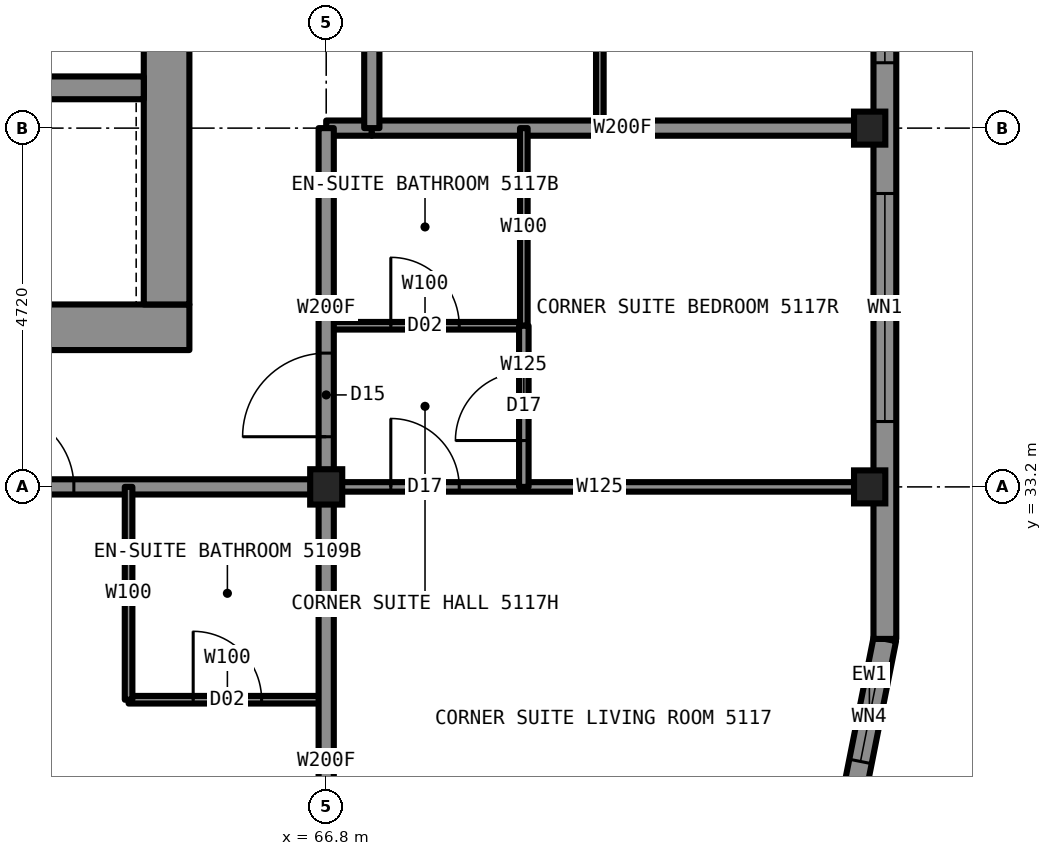
"""IFC4 building model, lengths in metres.
Left out: names, types, materials, properties, quantities, classifications, styles, units other than length and angle.
Written with IfcOpenShell. Run it as: python <this file> out.ifc"""

import sys

from ifc_helpers import new_model, si_unit, direction, frame, frame_2d, origin, origin_2d, place, context, subcontext, project, spatial, rectangle, i_section, extrude, element, fill, save


model = new_model("IFC4")
c1 = context("Model", 3, precision=1e-05, world=origin(), true_north=direction((0.0, 1.0)))
c2 = subcontext(c1, "Body", "Model", "MODEL_VIEW")
j1 = project(units=[si_unit("LENGTHUNIT", "METRE"), si_unit("PLANEANGLEUNIT", "RADIAN")], contexts=[c1])
p1 = place(None, origin())
s1 = spatial("IfcSite", under=j1, at=p1, CompositionType="ELEMENT")
p2 = place(p1, origin())
s2 = spatial("IfcBuilding", under=s1, at=p2, CompositionType="ELEMENT")
p3 = place(p2, frame((0.0, 0.0, 182.8)))
s3 = spatial("IfcBuildingStorey", under=s2, at=p3, CompositionType="ELEMENT", Elevation=182.8)
for number, where, z_axis, x_axis in (
    (1, (73.95, 33.2, 0.0), (0.0, 0.0, 1.0), (1.0, 0.0, 0.0)),
    (2, (73.95, 37.92, 0.0), (0.0, 0.0, 1.0), (1.0, 0.0, 0.0)),
):
    element("IfcColumn", number, at=place(p3, frame(where, z_axis=z_axis, x_axis=x_axis)), inside=s3, PredefinedType="COLUMN", context=c2, shape_type="SweptSolid", body=[
        extrude(i_section(OverallWidth=0.411, OverallDepth=0.434, WebThickness=0.036, FlangeThickness=0.057, at=origin_2d()), origin(), (0.0, 0.0, 1.0), 3.5),
    ])
p4 = place(p3, frame((66.8, 33.2, 0.0), z_axis=(0.0, 0.0, 1.0), x_axis=(1.0, 0.0, 0.0)))
e3 = element("IfcColumn", 3, at=p4, inside=s3, PredefinedType="COLUMN", context=c2, shape_type="SweptSolid", body=[
    extrude(i_section(OverallWidth=0.422, OverallDepth=0.465, WebThickness=0.045, FlangeThickness=0.073, at=origin_2d()), origin(), (0.0, 0.0, 1.0), 3.5),
])
p5 = place(p3, frame((45.0, 35.3, 0.0), z_axis=(0.0, 0.0, 1.0), x_axis=(1.0, 0.0, 0.0)))
e4 = element("IfcWall", 4, at=p5, inside=s3, PredefinedType="SHEAR", context=c2, shape_type="SweptSolid", body=[
    extrude(rectangle(XDim=20.0, YDim=0.6, at=frame_2d((10.0, 0.0))), origin(), (0.0, 0.0, 1.0), 3.5),
])
p6 = place(p3, frame((64.7, 35.6, 0.0), z_axis=(0.0, 0.0, 1.0), x_axis=(0.0, 1.0, 0.0)))
e5 = element("IfcWall", 5, at=p6, inside=s3, PredefinedType="SHEAR", context=c2, shape_type="SweptSolid", body=[
    extrude(rectangle(XDim=18.8, YDim=0.6, at=frame_2d((9.4, 0.0))), origin(), (0.0, 0.0, 1.0), 3.5),
])
p7 = place(p6, frame((13.4, 0.0, 0.0)))
e6 = element("IfcOpeningElement", 6, at=p7, cuts=e5, PredefinedType="OPENING", context=c2, shape_type="SweptSolid", body=[
    extrude(rectangle(XDim=1.8, YDim=2.2, at=frame_2d((0.9, 1.1))), frame((0.0, 0.31, 0.0), z_axis=(0.0, -1.0, 0.0), x_axis=(1.0, 0.0, 0.0)), (0.0, 0.0, 1.0), 0.62),
])
p8 = place(p6, frame((3.6, 0.0, 0.0)))
e7 = element("IfcOpeningElement", 7, at=p8, cuts=e5, PredefinedType="OPENING", context=c2, shape_type="SweptSolid", body=[
    extrude(rectangle(XDim=1.8, YDim=2.2, at=frame_2d((0.9, 1.1))), frame((0.0, 0.31, 0.0), z_axis=(0.0, -1.0, 0.0), x_axis=(1.0, 0.0, 0.0)), (0.0, 0.0, 1.0), 0.62),
])
p9 = place(p3, frame((45.6, 38.45, 0.0), z_axis=(0.0, 0.0, 1.0), x_axis=(1.0, 0.0, 0.0)))
e8 = element("IfcWall", 8, at=p9, inside=s3, PredefinedType="SHEAR", context=c2, shape_type="SweptSolid", body=[
    extrude(rectangle(XDim=18.8, YDim=0.3, at=frame_2d((9.4, 0.0))), origin(), (0.0, 0.0, 1.0), 3.5),
])
p10 = place(p9, frame((0.7, 0.0, 0.0)))
e9 = element("IfcOpeningElement", 9, at=p10, cuts=e8, PredefinedType="OPENING", context=c2, shape_type="SweptSolid", body=[
    extrude(rectangle(XDim=1.1, YDim=2.2, at=frame_2d((0.55, 1.1))), frame((0.0, 0.16, 0.0), z_axis=(0.0, -1.0, 0.0), x_axis=(1.0, 0.0, 0.0)), (0.0, 0.0, 1.0), 0.32),
])
p11 = place(p9, frame((3.4, 0.0, 0.0)))
e10 = element("IfcOpeningElement", 10, at=p11, cuts=e8, PredefinedType="OPENING", context=c2, shape_type="SweptSolid", body=[
    extrude(rectangle(XDim=1.1, YDim=2.2, at=frame_2d((0.55, 1.1))), frame((0.0, 0.16, 0.0), z_axis=(0.0, -1.0, 0.0), x_axis=(1.0, 0.0, 0.0)), (0.0, 0.0, 1.0), 0.32),
])
p12 = place(p9, frame((6.1, 0.0, 0.0)))
e11 = element("IfcOpeningElement", 11, at=p12, cuts=e8, PredefinedType="OPENING", context=c2, shape_type="SweptSolid", body=[
    extrude(rectangle(XDim=1.1, YDim=2.2, at=frame_2d((0.55, 1.1))), frame((0.0, 0.16, 0.0), z_axis=(0.0, -1.0, 0.0), x_axis=(1.0, 0.0, 0.0)), (0.0, 0.0, 1.0), 0.32),
])
p13 = place(p9, frame((8.8, 0.0, 0.0)))
e12 = element("IfcOpeningElement", 12, at=p13, cuts=e8, PredefinedType="OPENING", context=c2, shape_type="SweptSolid", body=[
    extrude(rectangle(XDim=1.1, YDim=2.2, at=frame_2d((0.55, 1.1))), frame((0.0, 0.16, 0.0), z_axis=(0.0, -1.0, 0.0), x_axis=(1.0, 0.0, 0.0)), (0.0, 0.0, 1.0), 0.32),
])
p14 = place(p3, frame((43.2, 33.2, 0.0), z_axis=(0.0, 0.0, 1.0), x_axis=(1.0, 0.0, 0.0)))
e13 = element("IfcWall", 13, at=p14, inside=s3, PredefinedType="PARTITIONING", context=c2, shape_type="SweptSolid", body=[
    extrude(rectangle(XDim=23.6, YDim=0.2, at=frame_2d((11.8, 0.0))), origin(), (0.0, 0.0, 1.0), 3.33),
])
p15 = place(p14, frame((3.0, 0.0, 0.0)))
e14 = element("IfcOpeningElement", 14, at=p15, cuts=e13, PredefinedType="OPENING", context=c2, shape_type="SweptSolid", body=[
    extrude(rectangle(XDim=1.0, YDim=2.2, at=frame_2d((0.5, 1.1))), frame((0.0, 0.11, 0.0), z_axis=(0.0, -1.0, 0.0), x_axis=(1.0, 0.0, 0.0)), (0.0, 0.0, 1.0), 0.22),
])
p16 = place(p14, frame((11.99, 0.0, 0.0)))
e15 = element("IfcOpeningElement", 15, at=p16, cuts=e13, PredefinedType="OPENING", context=c2, shape_type="SweptSolid", body=[
    extrude(rectangle(XDim=1.0, YDim=2.2, at=frame_2d((0.5, 1.1))), frame((0.0, 0.11, 0.0), z_axis=(0.0, -1.0, 0.0), x_axis=(1.0, 0.0, 0.0)), (0.0, 0.0, 1.0), 0.22),
])
p17 = place(p14, frame((16.71, 0.0, 0.0)))
e16 = element("IfcOpeningElement", 16, at=p17, cuts=e13, PredefinedType="OPENING", context=c2, shape_type="SweptSolid", body=[
    extrude(rectangle(XDim=1.0, YDim=2.2, at=frame_2d((0.5, 1.1))), frame((0.0, 0.11, 0.0), z_axis=(0.0, -1.0, 0.0), x_axis=(1.0, 0.0, 0.0)), (0.0, 0.0, 1.0), 0.22),
])
p18 = place(p14, frame((19.28, 0.0, 0.0)))
e17 = element("IfcOpeningElement", 17, at=p18, cuts=e13, PredefinedType="OPENING", context=c2, shape_type="SweptSolid", body=[
    extrude(rectangle(XDim=1.0, YDim=2.2, at=frame_2d((0.5, 1.1))), frame((0.0, 0.11, 0.0), z_axis=(0.0, -1.0, 0.0), x_axis=(1.0, 0.0, 0.0)), (0.0, 0.0, 1.0), 0.22),
])
p19 = place(p3, frame((66.8, 33.2, 0.0), z_axis=(0.0, 0.0, 1.0), x_axis=(1.0, 0.0, 0.0)))
e18 = element("IfcWall", 18, at=p19, inside=s3, PredefinedType="PARTITIONING", context=c2, shape_type="SweptSolid", body=[
    extrude(rectangle(XDim=7.2, YDim=0.125, at=frame_2d((3.6, 0.0))), origin(), (0.0, 0.0, 1.0), 2.573),
])
p20 = place(p19, frame((0.85, 0.0, 0.0)))
e19 = element("IfcOpeningElement", 19, at=p20, cuts=e18, PredefinedType="OPENING", context=c2, shape_type="SweptSolid", body=[
    extrude(rectangle(XDim=0.9, YDim=2.2, at=frame_2d((0.45, 1.1))), frame((0.0, 0.073, 0.0), z_axis=(0.0, -1.0, 0.0), x_axis=(1.0, 0.0, 0.0)), (0.0, 0.0, 1.0), 0.145),
])
p21 = place(p3, frame((64.2, 30.4, 0.0), z_axis=(0.0, 0.0, 1.0), x_axis=(1.0, 0.0, 0.0)))
e20 = element("IfcWall", 20, at=p21, inside=s3, PredefinedType="PARTITIONING", context=c2, shape_type="SweptSolid", body=[
    extrude(rectangle(XDim=2.6, YDim=0.1, at=frame_2d((1.3, 0.0))), origin(), (0.0, 0.0, 1.0), 3.33),
])
p22 = place(p21, frame((0.85, 0.0, 0.0)))
e21 = element("IfcOpeningElement", 21, at=p22, cuts=e20, PredefinedType="OPENING", context=c2, shape_type="SweptSolid", body=[
    extrude(rectangle(XDim=0.9, YDim=2.1, at=frame_2d((0.45, 1.05))), frame((0.0, 0.06, 0.0), z_axis=(0.0, -1.0, 0.0), x_axis=(1.0, 0.0, 0.0)), (0.0, 0.0, 1.0), 0.12),
])
p23 = place(p3, frame((66.8, 37.92, 0.0), z_axis=(0.0, 0.0, 1.0), x_axis=(1.0, 0.0, 0.0)))
e22 = element("IfcWall", 22, at=p23, inside=s3, PredefinedType="PARTITIONING", context=c2, shape_type="SweptSolid", body=[
    extrude(rectangle(XDim=0.6, YDim=0.2, at=frame_2d((0.3, 0.0))), origin(), (0.0, 0.0, 1.0), 2.573),
])
p24 = place(p3, frame((67.4, 37.92, 0.0), z_axis=(0.0, 0.0, 1.0), x_axis=(1.0, 0.0, 0.0)))
e23 = element("IfcWall", 23, at=p24, inside=s3, PredefinedType="PARTITIONING", context=c2, shape_type="SweptSolid", body=[
    extrude(rectangle(XDim=6.6, YDim=0.2, at=frame_2d((3.3, 0.0))), origin(), (0.0, 0.0, 1.0), 2.573),
])
p25 = place(p3, frame((66.8, 35.32, 0.0), z_axis=(0.0, 0.0, 1.0), x_axis=(1.0, 0.0, 0.0)))
e24 = element("IfcWall", 24, at=p25, inside=s3, PredefinedType="PARTITIONING", context=c2, shape_type="SweptSolid", body=[
    extrude(rectangle(XDim=2.6, YDim=0.1, at=frame_2d((1.3, 0.0))), origin(), (0.0, 0.0, 1.0), 3.33),
])
p26 = place(p25, frame((0.85, 0.0, 0.0)))
e25 = element("IfcOpeningElement", 25, at=p26, cuts=e24, PredefinedType="OPENING", context=c2, shape_type="SweptSolid", body=[
    extrude(rectangle(XDim=0.9, YDim=2.1, at=frame_2d((0.45, 1.05))), frame((0.0, 0.06, 0.0), z_axis=(0.0, -1.0, 0.0), x_axis=(1.0, 0.0, 0.0)), (0.0, 0.0, 1.0), 0.12),
])
p27 = place(p3, frame((66.8, 33.2, 0.0), z_axis=(0.0, 0.0, 1.0), x_axis=(0.0, 1.0, 0.0)))
e26 = element("IfcWall", 26, at=p27, inside=s3, PredefinedType="PARTITIONING", context=c2, shape_type="SweptSolid", body=[
    extrude(rectangle(XDim=4.72, YDim=0.2, at=frame_2d((2.36, 0.0))), origin(), (0.0, 0.0, 1.0), 3.33),
])
p28 = place(p27, frame((0.66, 0.0, 0.0)))
e27 = element("IfcOpeningElement", 27, at=p28, cuts=e26, PredefinedType="OPENING", context=c2, shape_type="SweptSolid", body=[
    extrude(rectangle(XDim=1.1, YDim=2.2, at=frame_2d((0.55, 1.1))), frame((0.0, 0.11, 0.0), z_axis=(0.0, -1.0, 0.0), x_axis=(1.0, 0.0, 0.0)), (0.0, 0.0, 1.0), 0.22),
])
p29 = place(p3, frame((66.8, 26.0, 0.0), z_axis=(0.0, 0.0, 1.0), x_axis=(0.0, 1.0, 0.0)))
e28 = element("IfcWall", 28, at=p29, inside=s3, PredefinedType="PARTITIONING", context=c2, shape_type="SweptSolid", body=[
    extrude(rectangle(XDim=7.2, YDim=0.2, at=frame_2d((3.6, 0.0))), origin(), (0.0, 0.0, 1.0), 2.573),
])
p30 = place(p3, frame((67.4, 37.92, 0.0), z_axis=(0.0, 0.0, 1.0), x_axis=(0.0, 1.0, 0.0)))
e29 = element("IfcWall", 29, at=p30, inside=s3, PredefinedType="PARTITIONING", context=c2, shape_type="SweptSolid", body=[
    extrude(rectangle(XDim=14.16, YDim=0.2, at=frame_2d((7.08, 0.0))), origin(), (0.0, 0.0, 1.0), 3.33),
])
p31 = place(p30, frame((3.0, 0.0, 0.0)))
e30 = element("IfcOpeningElement", 30, at=p31, cuts=e29, PredefinedType="OPENING", context=c2, shape_type="SweptSolid", body=[
    extrude(rectangle(XDim=1.0, YDim=2.2, at=frame_2d((0.5, 1.1))), frame((0.0, 0.11, 0.0), z_axis=(0.0, -1.0, 0.0), x_axis=(1.0, 0.0, 0.0)), (0.0, 0.0, 1.0), 0.22),
])
p32 = place(p30, frame((12.59, 0.0, 0.0)))
e31 = element("IfcOpeningElement", 31, at=p32, cuts=e29, PredefinedType="OPENING", context=c2, shape_type="SweptSolid", body=[
    extrude(rectangle(XDim=1.0, YDim=2.2, at=frame_2d((0.5, 1.1))), frame((0.0, 0.11, 0.0), z_axis=(0.0, -1.0, 0.0), x_axis=(1.0, 0.0, 0.0)), (0.0, 0.0, 1.0), 0.22),
])
p33 = place(p3, frame((69.4, 35.32, 0.0), z_axis=(0.0, 0.0, 1.0), x_axis=(0.0, 1.0, 0.0)))
e32 = element("IfcWall", 32, at=p33, inside=s3, PredefinedType="PARTITIONING", context=c2, shape_type="SweptSolid", body=[
    extrude(rectangle(XDim=2.6, YDim=0.1, at=frame_2d((1.3, 0.0))), origin(), (0.0, 0.0, 1.0), 3.33),
])
p34 = place(p3, frame((69.4, 33.2, 0.0), z_axis=(0.0, 0.0, 1.0), x_axis=(0.0, 1.0, 0.0)))
e33 = element("IfcWall", 33, at=p34, inside=s3, PredefinedType="PARTITIONING", context=c2, shape_type="SweptSolid", body=[
    extrude(rectangle(XDim=2.12, YDim=0.125, at=frame_2d((1.06, 0.0))), origin(), (0.0, 0.0, 1.0), 3.33),
])
p35 = place(p34, frame((0.61, 0.0, 0.0)))
e34 = element("IfcOpeningElement", 34, at=p35, cuts=e33, PredefinedType="OPENING", context=c2, shape_type="SweptSolid", body=[
    extrude(rectangle(XDim=0.9, YDim=2.2, at=frame_2d((0.45, 1.1))), frame((0.0, 0.073, 0.0), z_axis=(0.0, -1.0, 0.0), x_axis=(1.0, 0.0, 0.0)), (0.0, 0.0, 1.0), 0.145),
])
p36 = place(p3, frame((70.4, 37.92, 0.0), z_axis=(0.0, 0.0, 1.0), x_axis=(0.0, 1.0, 0.0)))
e35 = element("IfcWall", 35, at=p36, inside=s3, PredefinedType="PARTITIONING", context=c2, shape_type="SweptSolid", body=[
    extrude(rectangle(XDim=2.6, YDim=0.1, at=frame_2d((1.3, 0.0))), origin(), (0.0, 0.0, 1.0), 3.33),
])
p37 = place(p3, frame((64.2, 30.4, 0.0), z_axis=(0.0, 0.0, 1.0), x_axis=(0.0, 1.0, 0.0)))
e36 = element("IfcWall", 36, at=p37, inside=s3, PredefinedType="PARTITIONING", context=c2, shape_type="SweptSolid", body=[
    extrude(rectangle(XDim=2.8, YDim=0.1, at=frame_2d((1.4, 0.0))), origin(), (0.0, 0.0, 1.0), 3.33),
])
p38 = place(p3, frame((73.743, 29.153, 0.0), z_axis=(0.0, 0.0, 1.0), x_axis=(0.195081421501, 0.980787050784, 0.0)))
e37 = element("IfcWall", 37, at=p38, inside=s3, PredefinedType="SOLIDWALL", context=c2, shape_type="SweptSolid", body=[
    extrude(rectangle(XDim=2.087, YDim=0.3, at=frame_2d((1.044, 0.0))), origin(), (0.0, 0.0, 1.0), 3.33),
])
p39 = place(p38, frame((0.444, 0.0, 0.3)))
e38 = element("IfcOpeningElement", 38, at=p39, cuts=e37, PredefinedType="OPENING", context=c2, shape_type="SweptSolid", body=[
    extrude(rectangle(XDim=1.2, YDim=2.0, at=frame_2d((0.6, 1.0))), frame((0.0, 0.16, 0.0), z_axis=(0.0, -1.0, 0.0), x_axis=(1.0, 0.0, 0.0)), (0.0, 0.0, 1.0), 0.32),
])
p40 = place(p3, frame((74.15, 31.2, 0.0), z_axis=(0.0, 0.0, 1.0), x_axis=(0.0, 1.0, 0.0)))
e39 = element("IfcWall", 39, at=p40, inside=s3, PredefinedType="SOLIDWALL", context=c2, shape_type="SweptSolid", body=[
    extrude(rectangle(XDim=27.6, YDim=0.3, at=frame_2d((13.8, 0.0))), origin(), (0.0, 0.0, 1.0), 2.83),
])
p41 = place(p40, frame((2.86, 0.0, 0.3)))
e40 = element("IfcOpeningElement", 40, at=p41, cuts=e39, PredefinedType="OPENING", context=c2, shape_type="SweptSolid", body=[
    extrude(rectangle(XDim=3.0, YDim=2.0, at=frame_2d((1.5, 1.0))), frame((0.0, 0.16, 0.0), z_axis=(0.0, -1.0, 0.0), x_axis=(1.0, 0.0, 0.0)), (0.0, 0.0, 1.0), 0.32),
])
p42 = place(p40, frame((9.88, 0.0, 0.3)))
e41 = element("IfcOpeningElement", 41, at=p42, cuts=e39, PredefinedType="OPENING", context=c2, shape_type="SweptSolid", body=[
    extrude(rectangle(XDim=0.7, YDim=1.1, at=frame_2d((0.35, 0.55))), frame((0.0, 0.16, 0.0), z_axis=(0.0, -1.0, 0.0), x_axis=(1.0, 0.0, 0.0)), (0.0, 0.0, 1.0), 0.32),
])
p43 = place(p40, frame((12.3, 0.0, 0.3)))
e42 = element("IfcOpeningElement", 42, at=p43, cuts=e39, PredefinedType="OPENING", context=c2, shape_type="SweptSolid", body=[
    extrude(rectangle(XDim=3.0, YDim=2.0, at=frame_2d((1.5, 1.0))), frame((0.0, 0.16, 0.0), z_axis=(0.0, -1.0, 0.0), x_axis=(1.0, 0.0, 0.0)), (0.0, 0.0, 1.0), 0.32),
])
p44 = place(p40, frame((17.02, 0.0, 0.3)))
e43 = element("IfcOpeningElement", 43, at=p44, cuts=e39, PredefinedType="OPENING", context=c2, shape_type="SweptSolid", body=[
    extrude(rectangle(XDim=0.7, YDim=1.1, at=frame_2d((0.35, 0.55))), frame((0.0, 0.16, 0.0), z_axis=(0.0, -1.0, 0.0), x_axis=(1.0, 0.0, 0.0)), (0.0, 0.0, 1.0), 0.32),
])
p45 = place(p40, frame((21.74, 0.0, 0.3)))
e44 = element("IfcOpeningElement", 44, at=p45, cuts=e39, PredefinedType="OPENING", context=c2, shape_type="SweptSolid", body=[
    extrude(rectangle(XDim=3.0, YDim=2.0, at=frame_2d((1.5, 1.0))), frame((0.0, 0.16, 0.0), z_axis=(0.0, -1.0, 0.0), x_axis=(1.0, 0.0, 0.0)), (0.0, 0.0, 1.0), 0.32),
])
p46 = place(p18, origin())
e45 = element("IfcDoor", 45, at=p46, inside=s3, OperationType="SINGLE_SWING_LEFT", PredefinedType="DOOR", context=c2, shape_type="SweptSolid", body=[
    extrude(rectangle(XDim=1.0, YDim=2.2, at=frame_2d((0.5, 1.1))), frame((0.0, 0.025, 0.0), z_axis=(0.0, -1.0, 0.0), x_axis=(1.0, 0.0, 0.0)), (0.0, 0.0, 1.0), 0.05),
])
fill(e17, e45)
p47 = place(p22, origin())
e46 = element("IfcDoor", 46, at=p47, inside=s3, OperationType="SINGLE_SWING_RIGHT", PredefinedType="DOOR", context=c2, shape_type="SweptSolid", body=[
    extrude(rectangle(XDim=0.9, YDim=2.1, at=frame_2d((0.45, 1.05))), frame((0.0, 0.025, 0.0), z_axis=(0.0, -1.0, 0.0), x_axis=(1.0, 0.0, 0.0)), (0.0, 0.0, 1.0), 0.05),
])
fill(e21, e46)
p48 = place(p20, origin())
e47 = element("IfcDoor", 47, at=p48, inside=s3, OperationType="SINGLE_SWING_LEFT", PredefinedType="DOOR", context=c2, shape_type="SweptSolid", body=[
    extrude(rectangle(XDim=0.9, YDim=2.2, at=frame_2d((0.45, 1.1))), frame((0.0, 0.025, 0.0), z_axis=(0.0, -1.0, 0.0), x_axis=(1.0, 0.0, 0.0)), (0.0, 0.0, 1.0), 0.05),
])
fill(e19, e47)
p49 = place(p26, origin())
e48 = element("IfcDoor", 48, at=p49, inside=s3, OperationType="SINGLE_SWING_RIGHT", PredefinedType="DOOR", context=c2, shape_type="SweptSolid", body=[
    extrude(rectangle(XDim=0.9, YDim=2.1, at=frame_2d((0.45, 1.05))), frame((0.0, 0.025, 0.0), z_axis=(0.0, -1.0, 0.0), x_axis=(1.0, 0.0, 0.0)), (0.0, 0.0, 1.0), 0.05),
])
fill(e25, e48)
p50 = place(p28, origin())
e49 = element("IfcDoor", 49, at=p50, inside=s3, OperationType="SINGLE_SWING_LEFT", PredefinedType="DOOR", context=c2, shape_type="SweptSolid", body=[
    extrude(rectangle(XDim=1.1, YDim=2.2, at=frame_2d((0.55, 1.1))), frame((0.0, 0.025, 0.0), z_axis=(0.0, -1.0, 0.0), x_axis=(1.0, 0.0, 0.0)), (0.0, 0.0, 1.0), 0.05),
])
fill(e27, e49)
p51 = place(p35, origin())
e50 = element("IfcDoor", 50, at=p51, inside=s3, OperationType="SINGLE_SWING_LEFT", PredefinedType="DOOR", context=c2, shape_type="SweptSolid", body=[
    extrude(rectangle(XDim=0.9, YDim=2.2, at=frame_2d((0.45, 1.1))), frame((0.0, 0.025, 0.0), z_axis=(0.0, -1.0, 0.0), x_axis=(1.0, 0.0, 0.0)), (0.0, 0.0, 1.0), 0.05),
])
fill(e34, e50)
p52 = place(p39, origin())
e51 = element("IfcWindow", 51, at=p52, inside=s3, PartitioningType="SINGLE_PANEL", PredefinedType="WINDOW", context=c2, shape_type="SweptSolid", body=[
    extrude(rectangle(XDim=1.2, YDim=2.0, at=frame_2d((0.6, 1.0))), frame((0.0, 0.13, 0.0), z_axis=(0.0, -1.0, 0.0), x_axis=(1.0, 0.0, 0.0)), (0.0, 0.0, 1.0), 0.06),
])
fill(e38, e51)
p53 = place(p41, origin())
e52 = element("IfcWindow", 52, at=p53, inside=s3, PartitioningType="SINGLE_PANEL", PredefinedType="WINDOW", context=c2, shape_type="SweptSolid", body=[
    extrude(rectangle(XDim=3.0, YDim=2.0, at=frame_2d((1.5, 1.0))), frame((0.0, 0.13, 0.0), z_axis=(0.0, -1.0, 0.0), x_axis=(1.0, 0.0, 0.0)), (0.0, 0.0, 1.0), 0.06),
])
fill(e40, e52)
save(model, sys.argv[1])
